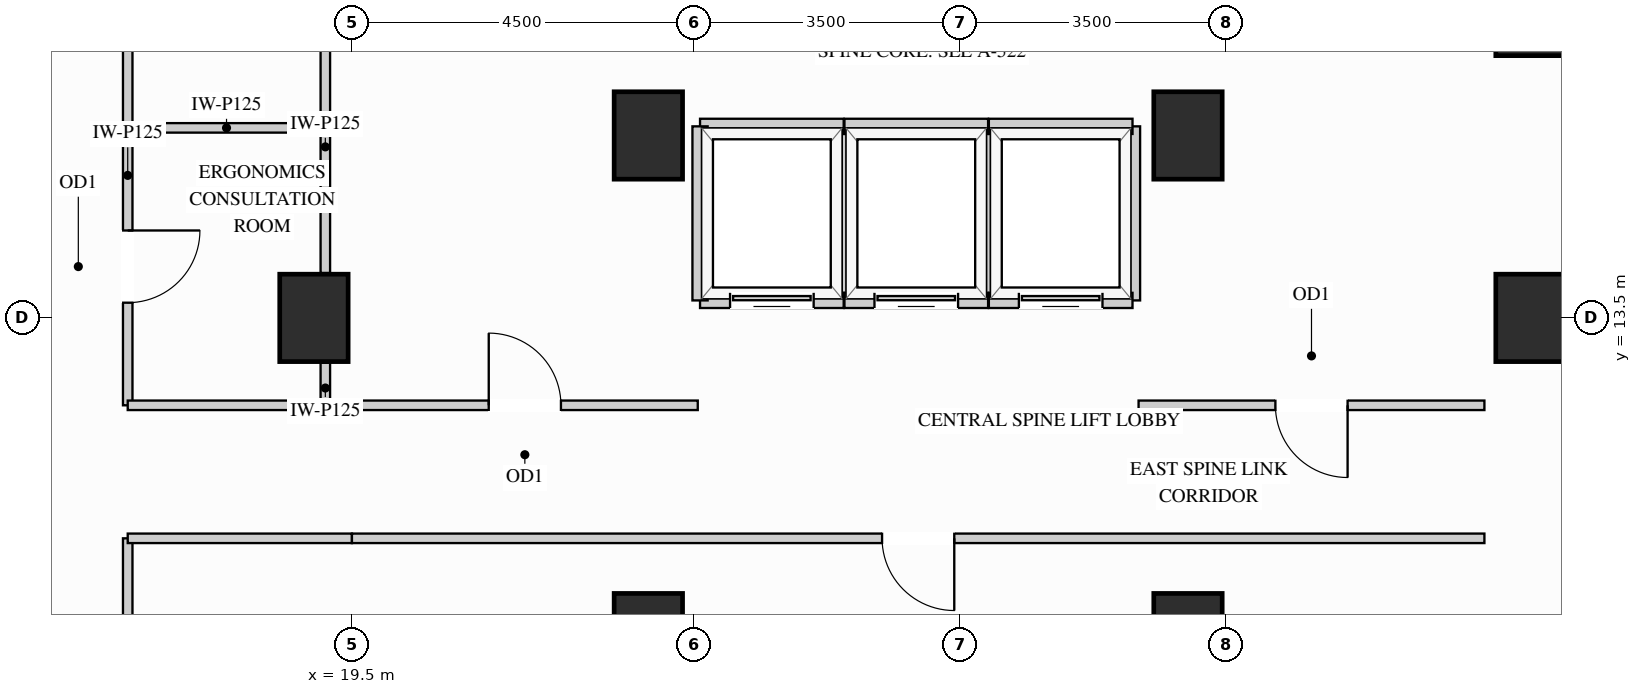
"""IFC4 building model, lengths in metres.
Left out: names, types, materials, properties, quantities, classifications, styles, units other than length and angle.
Written with IfcOpenShell. Run it as: python <this file> out.ifc"""

import sys

from ifc_helpers import new_model, si_unit, direction, frame, frame_2d, origin, origin_2d, place, context, subcontext, project, spatial, rectangle, extrude, source, transform, mapped, element, fill, save


model = new_model("IFC4")
c1 = context("Model", 3, precision=1e-05, world=origin(), true_north=direction((0.0, 1.0)))
c2 = subcontext(c1, "Body", "Model", "MODEL_VIEW")
j1 = project(units=[si_unit("LENGTHUNIT", "METRE"), si_unit("PLANEANGLEUNIT", "RADIAN")], contexts=[c1])
p1 = place(None, origin())
s1 = spatial("IfcSite", under=j1, at=p1, CompositionType="ELEMENT")
p2 = place(p1, origin())
s2 = spatial("IfcBuilding", under=s1, at=p2, CompositionType="ELEMENT")
p3 = place(p2, frame((0.0, 0.0, 117.0)))
s3 = spatial("IfcBuildingStorey", under=s2, at=p3, CompositionType="ELEMENT", Elevation=117.0)
m1 = source(origin(), c2, "Body", "SweptSolid", [
    extrude(rectangle(XDim=0.9, YDim=0.9, at=origin_2d()), origin(), (0.0, 0.0, 1.0), 3.38),
])
p4 = place(p3, frame((35.0, 17.4, 0.0), z_axis=(0.0, 0.0, 1.0), x_axis=(1.0, 0.0, 0.0)))
e1 = element("IfcColumn", 1, at=p4, inside=s3, PredefinedType="COLUMN", context=c2, shape_type="MappedRepresentation", body=[
    mapped(m1, transform((0.0, 0.0, 0.0), x_axis=(1.0, 0.0, 0.0), y_axis=(0.0, 1.0, 0.0), z_axis=(0.0, 0.0, 1.0))),
])
m2 = source(origin(), c2, "Body", "SweptSolid", [
    extrude(rectangle(XDim=0.9, YDim=1.15, at=origin_2d()), origin(), (0.0, 0.0, 1.0), 3.38),
])
for number, where, z_axis, x_axis in (
    (2, (19.0, 13.5, 0.0), (0.0, 0.0, 1.0), (1.0, 0.0, 0.0)),
    (3, (35.0, 13.5, 0.0), (0.0, 0.0, 1.0), (1.0, 0.0, 0.0)),
    (4, (23.4, 15.9, 0.0), (0.0, 0.0, 1.0), (1.0, 0.0, 0.0)),
    (5, (23.4, 9.3, 0.0), (0.0, 0.0, 1.0), (1.0, 0.0, 0.0)),
    (6, (30.5, 15.9, 0.0), (0.0, 0.0, 1.0), (1.0, 0.0, 0.0)),
    (7, (30.5, 9.3, 0.0), (0.0, 0.0, 1.0), (1.0, 0.0, 0.0)),
):
    element("IfcColumn", number, at=place(p3, frame(where, z_axis=z_axis, x_axis=x_axis)), inside=s3, PredefinedType="COLUMN", context=c2, shape_type="MappedRepresentation", body=[
        mapped(m2, transform((0.0, 0.0, 0.0), x_axis=(1.0, 0.0, 0.0), y_axis=(0.0, 1.0, 0.0), z_axis=(0.0, 0.0, 1.0))),
    ])
m3 = source(origin(), c2, "Body", "SweptSolid", [
    extrude(rectangle(XDim=2.6, YDim=0.125, at=frame_2d((1.3, 0.0))), origin(), (0.0, 0.0, 1.0), 3.365),
])
p5 = place(p3, frame((16.55, 16.0, 0.0), z_axis=(0.0, 0.0, 1.0), x_axis=(1.0, 0.0, 0.0)))
e8 = element("IfcWall", 8, at=p5, inside=s3, PredefinedType="PARTITIONING", context=c2, shape_type="MappedRepresentation", body=[
    mapped(m3, transform((0.0, 0.0, 0.0), x_axis=(1.0, 0.0, 0.0), y_axis=(0.0, 1.0, 0.0), z_axis=(0.0, 0.0, 1.0))),
])
m4 = source(origin(), c2, "Body", "SweptSolid", [
    extrude(rectangle(XDim=0.56, YDim=0.125, at=frame_2d((0.28, 0.0))), origin(), (0.0, 0.0, 1.0), 2.677),
])
p6 = place(p3, frame((19.15, 12.35, 0.0), z_axis=(0.0, 0.0, 1.0), x_axis=(0.0, 1.0, 0.0)))
e9 = element("IfcWall", 9, at=p6, inside=s3, PredefinedType="PARTITIONING", context=c2, shape_type="MappedRepresentation", body=[
    mapped(m4, transform((0.0, 0.0, 0.0), x_axis=(1.0, 0.0, 0.0), y_axis=(0.0, 1.0, 0.0), z_axis=(0.0, 0.0, 1.0))),
])
m5 = source(origin(), c2, "Body", "SweptSolid", [
    extrude(rectangle(XDim=3.32, YDim=0.125, at=frame_2d((1.66, 0.0))), origin(), (0.0, 0.0, 1.0), 2.677),
])
p7 = place(p3, frame((19.15, 14.09, 0.0), z_axis=(0.0, 0.0, 1.0), x_axis=(0.0, 1.0, 0.0)))
e10 = element("IfcWall", 10, at=p7, inside=s3, PredefinedType="PARTITIONING", context=c2, shape_type="MappedRepresentation", body=[
    mapped(m5, transform((0.0, 0.0, 0.0), x_axis=(1.0, 0.0, 0.0), y_axis=(0.0, 1.0, 0.0), z_axis=(0.0, 0.0, 1.0))),
])
p8 = place(p3, frame((16.55, 12.35, 0.0), z_axis=(0.0, 0.0, 1.0), x_axis=(0.0, 1.0, 0.0)))
e11 = element("IfcWall", 11, at=p8, inside=s3, PredefinedType="PARTITIONING", context=c2, shape_type="SweptSolid", body=[
    extrude(rectangle(XDim=3.65, YDim=0.125, at=frame_2d((1.825, 0.0))), origin(), (0.0, 0.0, 1.0), 3.365),
])
p9 = place(p8, frame((1.35, 0.0, 0.0)))
e12 = element("IfcOpeningElement", 12, at=p9, cuts=e11, PredefinedType="OPENING", context=c2, shape_type="SweptSolid", body=[
    extrude(rectangle(XDim=0.95, YDim=2.15, at=frame_2d((0.475, 1.075))), frame((0.0, 0.073, 0.0), z_axis=(0.0, -1.0, 0.0), x_axis=(1.0, 0.0, 0.0)), (0.0, 0.0, 1.0), 0.145),
])
p10 = place(p3, frame((16.55, 16.0, 0.0), z_axis=(0.0, 0.0, 1.0), x_axis=(0.0, 1.0, 0.0)))
e13 = element("IfcWall", 13, at=p10, inside=s3, PredefinedType="PARTITIONING", context=c2, shape_type="SweptSolid", body=[
    extrude(rectangle(XDim=7.35, YDim=0.125, at=frame_2d((3.675, 0.0))), origin(), (0.0, 0.0, 1.0), 3.365),
])
p11 = place(p10, frame((3.2, 0.0, 0.0)))
e14 = element("IfcOpeningElement", 14, at=p11, cuts=e13, PredefinedType="OPENING", context=c2, shape_type="SweptSolid", body=[
    extrude(rectangle(XDim=0.95, YDim=2.15, at=frame_2d((0.475, 1.075))), frame((0.0, 0.073, 0.0), z_axis=(0.0, -1.0, 0.0), x_axis=(1.0, 0.0, 0.0)), (0.0, 0.0, 1.0), 0.145),
])
p12 = place(p3, frame((16.55, 5.8, 0.0), z_axis=(0.0, 0.0, 1.0), x_axis=(0.0, 1.0, 0.0)))
e15 = element("IfcWall", 15, at=p12, inside=s3, PredefinedType="PARTITIONING", context=c2, shape_type="SweptSolid", body=[
    extrude(rectangle(XDim=4.8, YDim=0.125, at=frame_2d((2.4, 0.0))), origin(), (0.0, 0.0, 1.0), 3.365),
])
p13 = place(p12, frame((1.925, 0.0, 0.0)))
e16 = element("IfcOpeningElement", 16, at=p13, cuts=e15, PredefinedType="OPENING", context=c2, shape_type="SweptSolid", body=[
    extrude(rectangle(XDim=0.95, YDim=2.15, at=frame_2d((0.475, 1.075))), frame((0.0, 0.073, 0.0), z_axis=(0.0, -1.0, 0.0), x_axis=(1.0, 0.0, 0.0)), (0.0, 0.0, 1.0), 0.145),
])
p14 = place(p3, frame((29.85, 12.35, 0.0), z_axis=(0.0, 0.0, 1.0), x_axis=(1.0, 0.0, 0.0)))
e17 = element("IfcWall", 17, at=p14, inside=s3, PredefinedType="PARTITIONING", context=c2, shape_type="SweptSolid", body=[
    extrude(rectangle(XDim=4.55, YDim=0.125, at=frame_2d((2.275, 0.0))), origin(), (0.0, 0.0, 1.0), 3.365),
])
p15 = place(p14, frame((1.8, 0.0, 0.0)))
e18 = element("IfcOpeningElement", 18, at=p15, cuts=e17, PredefinedType="OPENING", context=c2, shape_type="SweptSolid", body=[
    extrude(rectangle(XDim=0.95, YDim=2.15, at=frame_2d((0.475, 1.075))), frame((0.0, 0.073, 0.0), z_axis=(0.0, -1.0, 0.0), x_axis=(1.0, 0.0, 0.0)), (0.0, 0.0, 1.0), 0.145),
])
m6 = source(origin(), c2, "Body", "SweptSolid", [
    extrude(rectangle(XDim=2.95, YDim=0.125, at=frame_2d((1.475, 0.0))), origin(), (0.0, 0.0, 1.0), 3.365),
])
p16 = place(p3, frame((16.55, 12.35, 0.0), z_axis=(0.0, 0.0, 1.0), x_axis=(1.0, 0.0, 0.0)))
e19 = element("IfcWall", 19, at=p16, inside=s3, PredefinedType="PARTITIONING", context=c2, shape_type="MappedRepresentation", body=[
    mapped(m6, transform((0.0, 0.0, 0.0), x_axis=(1.0, 0.0, 0.0), y_axis=(0.0, 1.0, 0.0), z_axis=(0.0, 0.0, 1.0))),
])
p17 = place(p3, frame((19.5, 12.35, 0.0), z_axis=(0.0, 0.0, 1.0), x_axis=(1.0, 0.0, 0.0)))
e20 = element("IfcWall", 20, at=p17, inside=s3, PredefinedType="PARTITIONING", context=c2, shape_type="SweptSolid", body=[
    extrude(rectangle(XDim=4.55, YDim=0.125, at=frame_2d((2.275, 0.0))), origin(), (0.0, 0.0, 1.0), 3.365),
])
p18 = place(p17, frame((1.8, 0.0, 0.0)))
e21 = element("IfcOpeningElement", 21, at=p18, cuts=e20, PredefinedType="OPENING", context=c2, shape_type="SweptSolid", body=[
    extrude(rectangle(XDim=0.95, YDim=2.15, at=frame_2d((0.475, 1.075))), frame((0.0, 0.073, 0.0), z_axis=(0.0, -1.0, 0.0), x_axis=(1.0, 0.0, 0.0)), (0.0, 0.0, 1.0), 0.145),
])
p19 = place(p3, frame((16.55, 10.6, 0.0), z_axis=(0.0, 0.0, 1.0), x_axis=(1.0, 0.0, 0.0)))
e22 = element("IfcWall", 22, at=p19, inside=s3, PredefinedType="PARTITIONING", context=c2, shape_type="MappedRepresentation", body=[
    mapped(m6, transform((0.0, 0.0, 0.0), x_axis=(1.0, 0.0, 0.0), y_axis=(0.0, 1.0, 0.0), z_axis=(0.0, 0.0, 1.0))),
])
p20 = place(p3, frame((19.5, 10.6, 0.0), z_axis=(0.0, 0.0, 1.0), x_axis=(1.0, 0.0, 0.0)))
e23 = element("IfcWall", 23, at=p20, inside=s3, PredefinedType="PARTITIONING", context=c2, shape_type="SweptSolid", body=[
    extrude(rectangle(XDim=14.9, YDim=0.125, at=frame_2d((7.45, 0.0))), origin(), (0.0, 0.0, 1.0), 3.365),
])
p21 = place(p20, frame((6.975, 0.0, 0.0)))
e24 = element("IfcOpeningElement", 24, at=p21, cuts=e23, PredefinedType="OPENING", context=c2, shape_type="SweptSolid", body=[
    extrude(rectangle(XDim=0.95, YDim=2.15, at=frame_2d((0.475, 1.075))), frame((0.0, 0.073, 0.0), z_axis=(0.0, -1.0, 0.0), x_axis=(1.0, 0.0, 0.0)), (0.0, 0.0, 1.0), 0.145),
])
m7 = source(origin(), c2, "Body", "SweptSolid", [
    extrude(rectangle(XDim=2.29, YDim=0.2, at=frame_2d((1.145, 0.0))), origin(), (0.0, 0.0, 1.0), 3.365),
])
p22 = place(p3, frame((25.97, 13.73, 0.0), z_axis=(0.0, 0.0, 1.0), x_axis=(0.0, 1.0, 0.0)))
e25 = element("IfcWall", 25, at=p22, inside=s3, PredefinedType="PARTITIONING", context=c2, shape_type="MappedRepresentation", body=[
    mapped(m7, transform((0.0, 0.0, 0.0), x_axis=(1.0, 0.0, 0.0), y_axis=(0.0, 1.0, 0.0), z_axis=(0.0, 0.0, 1.0))),
])
m8 = source(origin(), c2, "Body", "SweptSolid", [
    extrude(rectangle(XDim=1.89, YDim=0.2, at=frame_2d((0.945, 0.0))), origin(), (0.0, 0.0, 1.0), 2.677),
])
p23 = place(p3, frame((24.08, 16.02, 0.0), z_axis=(0.0, 0.0, 1.0), x_axis=(1.0, 0.0, 0.0)))
e26 = element("IfcWall", 26, at=p23, inside=s3, PredefinedType="PARTITIONING", context=c2, shape_type="MappedRepresentation", body=[
    mapped(m8, transform((0.0, 0.0, 0.0), x_axis=(1.0, 0.0, 0.0), y_axis=(0.0, 1.0, 0.0), z_axis=(0.0, 0.0, 1.0))),
])
p24 = place(p3, frame((24.08, 13.73, 0.0), z_axis=(0.0, 0.0, 1.0), x_axis=(1.0, 0.0, 0.0)))
e27 = element("IfcWall", 27, at=p24, inside=s3, PredefinedType="PARTITIONING", context=c2, shape_type="SweptSolid", body=[
    extrude(rectangle(XDim=1.89, YDim=0.2, at=frame_2d((0.945, 0.0))), origin(), (0.0, 0.0, 1.0), 2.446),
])
p25 = place(p24, frame((0.395, 0.0, 0.0)))
e28 = element("IfcOpeningElement", 28, at=p25, cuts=e27, PredefinedType="OPENING", context=c2, shape_type="SweptSolid", body=[
    extrude(rectangle(XDim=1.1, YDim=2.2, at=frame_2d((0.55, 1.1))), frame((0.0, 0.11, 0.0), z_axis=(0.0, -1.0, 0.0), x_axis=(1.0, 0.0, 0.0)), (0.0, 0.0, 1.0), 0.22),
])
for number, where, z_axis, x_axis in (
    (29, (24.08, 13.73, 0.0), (0.0, 0.0, 1.0), (0.0, 1.0, 0.0)),
    (30, (27.87, 13.73, 0.0), (0.0, 0.0, 1.0), (0.0, 1.0, 0.0)),
):
    element("IfcWall", number, at=place(p3, frame(where, z_axis=z_axis, x_axis=x_axis)), inside=s3, PredefinedType="PARTITIONING", context=c2, shape_type="MappedRepresentation", body=[
        mapped(m7, transform((0.0, 0.0, 0.0), x_axis=(1.0, 0.0, 0.0), y_axis=(0.0, 1.0, 0.0), z_axis=(0.0, 0.0, 1.0))),
    ])
m9 = source(origin(), c2, "Body", "SweptSolid", [
    extrude(rectangle(XDim=1.89, YDim=0.2, at=frame_2d((0.945, 0.0))), origin(), (0.0, 0.0, 1.0), 2.677),
])
p26 = place(p3, frame((25.98, 16.02, 0.0), z_axis=(0.0, 0.0, 1.0), x_axis=(1.0, 0.0, 0.0)))
e31 = element("IfcWall", 31, at=p26, inside=s3, PredefinedType="PARTITIONING", context=c2, shape_type="MappedRepresentation", body=[
    mapped(m9, transform((0.0, 0.0, 0.0), x_axis=(1.0, 0.0, 0.0), y_axis=(0.0, 1.0, 0.0), z_axis=(0.0, 0.0, 1.0))),
])
p27 = place(p3, frame((25.98, 13.73, 0.0), z_axis=(0.0, 0.0, 1.0), x_axis=(1.0, 0.0, 0.0)))
e32 = element("IfcWall", 32, at=p27, inside=s3, PredefinedType="PARTITIONING", context=c2, shape_type="SweptSolid", body=[
    extrude(rectangle(XDim=1.89, YDim=0.2, at=frame_2d((0.945, 0.0))), origin(), (0.0, 0.0, 1.0), 2.446),
])
p28 = place(p27, frame((0.395, 0.0, 0.0)))
e33 = element("IfcOpeningElement", 33, at=p28, cuts=e32, PredefinedType="OPENING", context=c2, shape_type="SweptSolid", body=[
    extrude(rectangle(XDim=1.1, YDim=2.2, at=frame_2d((0.55, 1.1))), frame((0.0, 0.11, 0.0), z_axis=(0.0, -1.0, 0.0), x_axis=(1.0, 0.0, 0.0)), (0.0, 0.0, 1.0), 0.22),
])
p29 = place(p3, frame((29.77, 13.73, 0.0), z_axis=(0.0, 0.0, 1.0), x_axis=(0.0, 1.0, 0.0)))
e34 = element("IfcWall", 34, at=p29, inside=s3, PredefinedType="PARTITIONING", context=c2, shape_type="MappedRepresentation", body=[
    mapped(m7, transform((0.0, 0.0, 0.0), x_axis=(1.0, 0.0, 0.0), y_axis=(0.0, 1.0, 0.0), z_axis=(0.0, 0.0, 1.0))),
])
p30 = place(p3, frame((27.88, 16.02, 0.0), z_axis=(0.0, 0.0, 1.0), x_axis=(1.0, 0.0, 0.0)))
e35 = element("IfcWall", 35, at=p30, inside=s3, PredefinedType="PARTITIONING", context=c2, shape_type="MappedRepresentation", body=[
    mapped(m9, transform((0.0, 0.0, 0.0), x_axis=(1.0, 0.0, 0.0), y_axis=(0.0, 1.0, 0.0), z_axis=(0.0, 0.0, 1.0))),
])
p31 = place(p3, frame((27.88, 13.73, 0.0), z_axis=(0.0, 0.0, 1.0), x_axis=(1.0, 0.0, 0.0)))
e36 = element("IfcWall", 36, at=p31, inside=s3, PredefinedType="PARTITIONING", context=c2, shape_type="SweptSolid", body=[
    extrude(rectangle(XDim=1.89, YDim=0.2, at=frame_2d((0.945, 0.0))), origin(), (0.0, 0.0, 1.0), 2.446),
])
p32 = place(p31, frame((0.395, 0.0, 0.0)))
e37 = element("IfcOpeningElement", 37, at=p32, cuts=e36, PredefinedType="OPENING", context=c2, shape_type="SweptSolid", body=[
    extrude(rectangle(XDim=1.1, YDim=2.2, at=frame_2d((0.55, 1.1))), frame((0.0, 0.11, 0.0), z_axis=(0.0, -1.0, 0.0), x_axis=(1.0, 0.0, 0.0)), (0.0, 0.0, 1.0), 0.22),
])
m10 = source(origin(), c2, "Body", "SweptSolid", [
    extrude(rectangle(XDim=1.1, YDim=2.2, at=frame_2d((0.55, 1.1))), frame((0.0, 0.025, 0.0), z_axis=(0.0, -1.0, 0.0), x_axis=(1.0, 0.0, 0.0)), (0.0, 0.0, 1.0), 0.05),
])
p33 = place(p25, origin())
e38 = element("IfcDoor", 38, at=p33, inside=s3, OperationType="SLIDING_TO_LEFT", PredefinedType="DOOR", context=c2, shape_type="MappedRepresentation", body=[
    mapped(m10, transform((0.0, 0.0, 0.0), x_axis=(1.0, 0.0, 0.0), y_axis=(0.0, 1.0, 0.0), z_axis=(0.0, 0.0, 1.0))),
])
fill(e28, e38)
p34 = place(p28, origin())
e39 = element("IfcDoor", 39, at=p34, inside=s3, OperationType="SLIDING_TO_LEFT", PredefinedType="DOOR", context=c2, shape_type="MappedRepresentation", body=[
    mapped(m10, transform((0.0, 0.0, 0.0), x_axis=(1.0, 0.0, 0.0), y_axis=(0.0, 1.0, 0.0), z_axis=(0.0, 0.0, 1.0))),
])
fill(e33, e39)
p35 = place(p32, origin())
e40 = element("IfcDoor", 40, at=p35, inside=s3, OperationType="SLIDING_TO_LEFT", PredefinedType="DOOR", context=c2, shape_type="MappedRepresentation", body=[
    mapped(m10, transform((0.0, 0.0, 0.0), x_axis=(1.0, 0.0, 0.0), y_axis=(0.0, 1.0, 0.0), z_axis=(0.0, 0.0, 1.0))),
])
fill(e37, e40)
m11 = source(origin(), c2, "Body", "SweptSolid", [
    extrude(rectangle(XDim=0.95, YDim=2.15, at=frame_2d((0.475, 1.075))), frame((0.0, 0.025, 0.0), z_axis=(0.0, -1.0, 0.0), x_axis=(1.0, 0.0, 0.0)), (0.0, 0.0, 1.0), 0.05),
])
p36 = place(p9, origin())
e41 = element("IfcDoor", 41, at=p36, inside=s3, OperationType="SINGLE_SWING_RIGHT", PredefinedType="DOOR", context=c2, shape_type="MappedRepresentation", body=[
    mapped(m11, transform((0.0, 0.0, 0.0), x_axis=(1.0, 0.0, 0.0), y_axis=(0.0, 1.0, 0.0), z_axis=(0.0, 0.0, 1.0))),
])
fill(e12, e41)
p37 = place(p18, origin())
e42 = element("IfcDoor", 42, at=p37, inside=s3, OperationType="SINGLE_SWING_LEFT", PredefinedType="DOOR", context=c2, shape_type="MappedRepresentation", body=[
    mapped(m11, transform((0.0, 0.0, 0.0), x_axis=(1.0, 0.0, 0.0), y_axis=(0.0, 1.0, 0.0), z_axis=(0.0, 0.0, 1.0))),
])
fill(e21, e42)
p38 = place(p15, origin())
e43 = element("IfcDoor", 43, at=p38, inside=s3, OperationType="SINGLE_SWING_RIGHT", PredefinedType="DOOR", context=c2, shape_type="MappedRepresentation", body=[
    mapped(m11, transform((0.0, 0.0, 0.0), x_axis=(1.0, 0.0, 0.0), y_axis=(0.0, 1.0, 0.0), z_axis=(0.0, 0.0, 1.0))),
])
fill(e18, e43)
p39 = place(p21, origin())
e44 = element("IfcDoor", 44, at=p39, inside=s3, OperationType="SINGLE_SWING_RIGHT", PredefinedType="DOOR", context=c2, shape_type="MappedRepresentation", body=[
    mapped(m11, transform((0.0, 0.0, 0.0), x_axis=(1.0, 0.0, 0.0), y_axis=(0.0, 1.0, 0.0), z_axis=(0.0, 0.0, 1.0))),
])
fill(e24, e44)
save(model, sys.argv[1])
